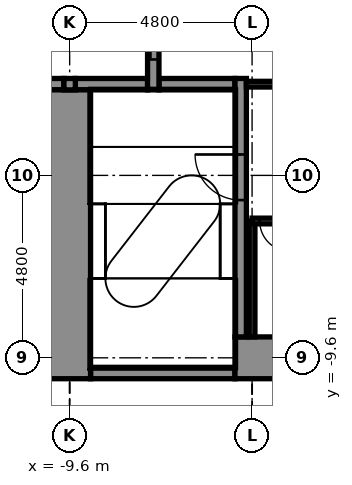
"""IFC4 building model, lengths in metres.
Left out: names, types, materials, properties, quantities, classifications, styles, units other than length and angle.
Written with IfcOpenShell. Run it as: python <this file> out.ifc"""

import sys

from ifc_helpers import new_model, si_unit, direction, frame, frame_2d, origin, place, context, subcontext, project, spatial, rectangle, extrude, element, fill, save


model = new_model("IFC4")
c1 = context("Model", 3, precision=1e-05, world=origin(), true_north=direction((0.0, 1.0)))
c2 = subcontext(c1, "Body", "Model", "MODEL_VIEW")
j1 = project(units=[si_unit("LENGTHUNIT", "METRE"), si_unit("PLANEANGLEUNIT", "RADIAN")], contexts=[c1])
p1 = place(None, origin())
s1 = spatial("IfcSite", under=j1, at=p1, CompositionType="ELEMENT")
p2 = place(p1, origin())
s2 = spatial("IfcBuilding", under=s1, at=p2, CompositionType="ELEMENT")
p3 = place(p2, frame((0.0, 0.0, 7.0)))
s3 = spatial("IfcBuildingStorey", under=s2, at=p3, CompositionType="ELEMENT", Elevation=7.0)
p4 = place(p3, frame((-9.05, -10.0, -0.3), z_axis=(0.0, 0.0, 1.0), x_axis=(1.0, 0.0, 0.0)))
e1 = element("IfcWall", 1, at=p4, inside=s3, PredefinedType="STANDARD", context=c2, shape_type="SweptSolid", body=[
    extrude(rectangle(XDim=3.8, YDim=0.3, at=frame_2d((1.9, 0.0))), origin(), (0.0, 0.0, 1.0), 5.4),
])
p5 = place(p3, frame((-5.25, -9.6, -0.3), z_axis=(0.0, 0.0, 1.0), x_axis=(1.0, 0.0, 0.0)))
e2 = element("IfcWall", 2, at=p5, inside=s3, PredefinedType="SHEAR", context=c2, shape_type="SweptSolid", body=[
    extrude(rectangle(XDim=10.2, YDim=1.1, at=frame_2d((5.1, 0.0))), origin(), (0.0, 0.0, 1.0), 5.4),
])
p6 = place(p5, frame((9.0, 0.0, 0.3)))
e3 = element("IfcOpeningElement", 3, at=p6, cuts=e2, PredefinedType="OPENING", context=c2, shape_type="SweptSolid", body=[
    extrude(rectangle(XDim=0.9, YDim=2.1, at=frame_2d((0.45, 1.05))), frame((0.0, 0.56, 0.0), z_axis=(0.0, -1.0, 0.0), x_axis=(1.0, 0.0, 0.0)), (0.0, 0.0, 1.0), 1.12),
])
p7 = place(p3, frame((-10.85, -2.4, -0.3), z_axis=(0.0, 0.0, 1.0), x_axis=(1.0, 0.0, 0.0)))
e4 = element("IfcWall", 4, at=p7, inside=s3, PredefinedType="STANDARD", context=c2, shape_type="SweptSolid", body=[
    extrude(rectangle(XDim=1.1, YDim=0.3, at=frame_2d((0.55, 0.0))), origin(), (0.0, 0.0, 1.0), 5.4),
])
p8 = place(p3, frame((-9.45, -2.4, -0.3), z_axis=(0.0, 0.0, 1.0), x_axis=(1.0, 0.0, 0.0)))
e5 = element("IfcWall", 5, at=p8, inside=s3, PredefinedType="STANDARD", context=c2, shape_type="SweptSolid", body=[
    extrude(rectangle(XDim=1.9, YDim=0.3, at=frame_2d((0.95, 0.0))), origin(), (0.0, 0.0, 1.0), 5.4),
])
p9 = place(p3, frame((-7.25, -2.4, -0.3), z_axis=(0.0, 0.0, 1.0), x_axis=(1.0, 0.0, 0.0)))
e6 = element("IfcWall", 6, at=p9, inside=s3, PredefinedType="STANDARD", context=c2, shape_type="SweptSolid", body=[
    extrude(rectangle(XDim=2.0, YDim=0.3, at=frame_2d((1.0, 0.0))), origin(), (0.0, 0.0, 1.0), 5.4),
])
p10 = place(p3, frame((-9.6, -10.15, -0.3), z_axis=(0.0, 0.0, 1.0), x_axis=(0.0, 1.0, 0.0)))
e7 = element("IfcWall", 7, at=p10, inside=s3, PredefinedType="SHEAR", context=c2, shape_type="SweptSolid", body=[
    extrude(rectangle(XDim=7.6, YDim=1.1, at=frame_2d((3.8, 0.0))), origin(), (0.0, 0.0, 1.0), 5.4),
])
p11 = place(p3, frame((-9.6, -2.55, -0.3), z_axis=(0.0, 0.0, 1.0), x_axis=(0.0, 1.0, 0.0)))
e8 = element("IfcWall", 8, at=p11, inside=s3, PredefinedType="STANDARD", context=c2, shape_type="SweptSolid", body=[
    extrude(rectangle(XDim=0.3, YDim=0.3, at=frame_2d((0.15, 0.0))), origin(), (0.0, 0.0, 1.0), 5.4),
])
p12 = place(p3, frame((-7.4, -2.55, -0.3), z_axis=(0.0, 0.0, 1.0), x_axis=(0.0, 1.0, 0.0)))
e9 = element("IfcWall", 9, at=p12, inside=s3, PredefinedType="STANDARD", context=c2, shape_type="SweptSolid", body=[
    extrude(rectangle(XDim=5.1, YDim=0.3, at=frame_2d((2.55, 0.0))), origin(), (0.0, 0.0, 1.0), 5.4),
])
p13 = place(p12, frame((0.8, 0.0, 0.3)))
e10 = element("IfcOpeningElement", 10, at=p13, cuts=e9, PredefinedType="OPENING", context=c2, shape_type="SweptSolid", body=[
    extrude(rectangle(XDim=1.1, YDim=2.1, at=frame_2d((0.55, 1.05))), frame((0.0, 0.16, 0.0), z_axis=(0.0, -1.0, 0.0), x_axis=(1.0, 0.0, 0.0)), (0.0, 0.0, 1.0), 0.32),
])
p14 = place(p12, frame((3.2, 0.0, 0.3)))
e11 = element("IfcOpeningElement", 11, at=p14, cuts=e9, PredefinedType="OPENING", context=c2, shape_type="SweptSolid", body=[
    extrude(rectangle(XDim=1.1, YDim=2.1, at=frame_2d((0.55, 1.05))), frame((0.0, 0.16, 0.0), z_axis=(0.0, -1.0, 0.0), x_axis=(1.0, 0.0, 0.0)), (0.0, 0.0, 1.0), 0.32),
])
p15 = place(p3, frame((-5.1, -9.05, -0.3), z_axis=(0.0, 0.0, 1.0), x_axis=(0.0, 1.0, 0.0)))
e12 = element("IfcWall", 12, at=p15, inside=s3, PredefinedType="STANDARD", context=c2, shape_type="SweptSolid", body=[
    extrude(rectangle(XDim=6.8, YDim=0.3, at=frame_2d((3.4, 0.0))), origin(), (0.0, 0.0, 1.0), 5.4),
])
p16 = place(p15, frame((3.6, 0.0, 0.3)))
e13 = element("IfcOpeningElement", 13, at=p16, cuts=e12, PredefinedType="OPENING", context=c2, shape_type="SweptSolid", body=[
    extrude(rectangle(XDim=1.2, YDim=2.1, at=frame_2d((0.6, 1.05))), frame((0.0, 0.16, 0.0), z_axis=(0.0, -1.0, 0.0), x_axis=(1.0, 0.0, 0.0)), (0.0, 0.0, 1.0), 0.32),
])
p17 = place(p3, frame((-4.8, -9.05, 0.0), z_axis=(0.0, 0.0, 1.0), x_axis=(0.0, 1.0, 0.0)))
e14 = element("IfcWall", 14, at=p17, inside=s3, PredefinedType="PARTITIONING", context=c2, shape_type="SweptSolid", body=[
    extrude(rectangle(XDim=3.05, YDim=0.15, at=frame_2d((1.525, 0.0))), origin(), (0.0, 0.0, 1.0), 5.1),
])
p18 = place(p3, frame((-4.8, -6.0, 0.0), z_axis=(0.0, 0.0, 1.0), x_axis=(1.0, 0.0, 0.0)))
e15 = element("IfcWall", 15, at=p18, inside=s3, PredefinedType="PARTITIONING", context=c2, shape_type="SweptSolid", body=[
    extrude(rectangle(XDim=1.05, YDim=0.15, at=frame_2d((0.525, 0.0))), origin(), (0.0, 0.0, 1.0), 5.1),
])
p19 = place(p18, frame((0.2, 0.0, 0.0)))
e16 = element("IfcOpeningElement", 16, at=p19, cuts=e15, PredefinedType="OPENING", context=c2, shape_type="SweptSolid", body=[
    extrude(rectangle(XDim=0.8, YDim=2.1, at=frame_2d((0.4, 1.05))), frame((0.0, 0.085, 0.0), z_axis=(0.0, -1.0, 0.0), x_axis=(1.0, 0.0, 0.0)), (0.0, 0.0, 1.0), 0.17),
])
p20 = place(p3, frame((-4.95, -2.4, 0.0), z_axis=(0.0, 0.0, 1.0), x_axis=(1.0, 0.0, 0.0)))
e17 = element("IfcWall", 17, at=p20, inside=s3, PredefinedType="PARTITIONING", context=c2, shape_type="SweptSolid", body=[
    extrude(rectangle(XDim=1.2, YDim=0.15, at=frame_2d((0.6, 0.0))), origin(), (0.0, 0.0, 1.0), 5.1),
])
p21 = place(p19, frame((0.8, 0.0, 0.0), z_axis=(0.0, 0.0, 1.0), x_axis=(-1.0, 0.0, 0.0)))
e18 = element("IfcDoor", 18, at=p21, inside=s3, OperationType="SINGLE_SWING_RIGHT", PredefinedType="DOOR", context=c2, shape_type="SweptSolid", body=[
    extrude(rectangle(XDim=0.8, YDim=2.1, at=frame_2d((0.4, 1.05))), frame((0.0, 0.025, 0.0), z_axis=(0.0, -1.0, 0.0), x_axis=(1.0, 0.0, 0.0)), (0.0, 0.0, 1.0), 0.05),
])
fill(e16, e18)
p22 = place(p13, origin())
e19 = element("IfcDoor", 19, at=p22, inside=s3, OperationType="DOUBLE_DOOR_SLIDING", PredefinedType="DOOR", context=c2, shape_type="SweptSolid", body=[
    extrude(rectangle(XDim=1.1, YDim=2.1, at=frame_2d((0.55, 1.05))), frame((0.0, 0.025, 0.0), z_axis=(0.0, -1.0, 0.0), x_axis=(1.0, 0.0, 0.0)), (0.0, 0.0, 1.0), 0.05),
])
fill(e10, e19)
p23 = place(p16, origin())
e20 = element("IfcDoor", 20, at=p23, inside=s3, OperationType="SINGLE_SWING_RIGHT", PredefinedType="DOOR", context=c2, shape_type="SweptSolid", body=[
    extrude(rectangle(XDim=1.2, YDim=2.1, at=frame_2d((0.6, 1.05))), frame((0.0, 0.025, 0.0), z_axis=(0.0, -1.0, 0.0), x_axis=(1.0, 0.0, 0.0)), (0.0, 0.0, 1.0), 0.05),
])
fill(e13, e20)
save(model, sys.argv[1])
